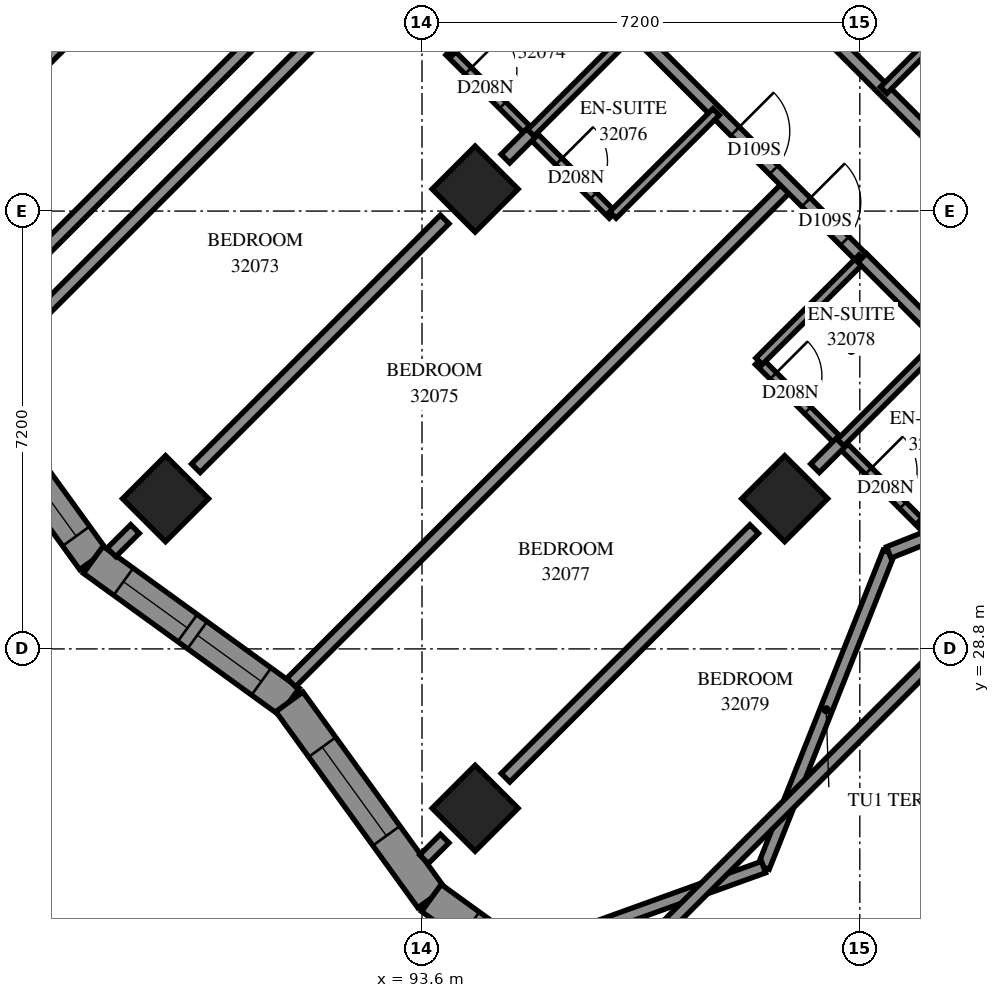
"""IFC4 building model, lengths in metres.
Left out: names, types, materials, properties, quantities, classifications, styles, units other than length and angle.
Written with IfcOpenShell. Run it as: python <this file> out.ifc"""

import sys

from ifc_helpers import new_model, si_unit, direction, frame, frame_2d, origin, origin_2d, place, context, subcontext, project, spatial, polyline, rectangle, outline, extrude, element, fill, save


model = new_model("IFC4")
c1 = context("Model", 3, precision=1e-05, world=origin(), true_north=direction((0.0, 1.0)))
c2 = subcontext(c1, "Body", "Model", "MODEL_VIEW")
j1 = project(units=[si_unit("LENGTHUNIT", "METRE"), si_unit("PLANEANGLEUNIT", "RADIAN")], contexts=[c1])
p1 = place(None, origin())
s1 = spatial("IfcSite", under=j1, at=p1, CompositionType="ELEMENT")
p2 = place(p1, origin())
s2 = spatial("IfcBuilding", under=s1, at=p2, CompositionType="ELEMENT")
p3 = place(p2, frame((0.0, 0.0, 118.6)))
s3 = spatial("IfcBuildingStorey", under=s2, at=p3, CompositionType="ELEMENT", Elevation=118.6)
for number, where, z_axis, x_axis in (
    (1, (94.474, 36.362, 0.0), (0.0, 0.0, 1.0), (0.707, -0.707, 0.0)),
    (2, (89.382, 31.271, 0.0), (0.0, 0.0, 1.0), (0.707, -0.707, 0.0)),
    (3, (99.565, 31.271, 0.0), (0.0, 0.0, 1.0), (0.707, -0.707, 0.0)),
    (4, (94.474, 26.18, 0.0), (0.0, 0.0, 1.0), (0.707, -0.707, 0.0)),
):
    element("IfcColumn", number, at=place(p3, frame(where, z_axis=z_axis, x_axis=x_axis)), inside=s3, PredefinedType="COLUMN", context=c2, shape_type="SweptSolid", body=[
        extrude(rectangle(XDim=1.0, YDim=1.0, at=origin_2d()), origin(), (0.0, 0.0, 1.0), 3.1),
    ])
p4 = place(p3, frame((87.12, 38.625, -0.3), z_axis=(0.0, 0.0, 1.0), x_axis=(0.7071067812, 0.7071067812, 0.0)))
e5 = element("IfcWall", 5, at=p4, inside=s3, PredefinedType="SHEAR", context=c2, shape_type="SweptSolid", body=[
    extrude(rectangle(XDim=14.4, YDim=0.8, at=frame_2d((7.2, 0.0))), origin(), (0.0, 0.0, 1.0), 2.7),
])
p5 = place(p4, frame((4.55, 0.0, 0.3)))
e6 = element("IfcOpeningElement", 6, at=p5, cuts=e5, PredefinedType="OPENING", context=c2, shape_type="SweptSolid", body=[
    extrude(rectangle(XDim=1.1, YDim=2.1, at=frame_2d((0.55, 1.05))), frame((0.0, 0.41, 0.0), z_axis=(0.0, -1.0, 0.0), x_axis=(1.0, 0.0, 0.0)), (0.0, 0.0, 1.0), 0.82),
])
p6 = place(p4, frame((11.35, 0.0, 0.3)))
e7 = element("IfcOpeningElement", 7, at=p6, cuts=e5, PredefinedType="OPENING", context=c2, shape_type="SweptSolid", body=[
    extrude(rectangle(XDim=1.1, YDim=2.1, at=frame_2d((0.55, 1.05))), frame((0.0, 0.41, 0.0), z_axis=(0.0, -1.0, 0.0), x_axis=(1.0, 0.0, 0.0)), (0.0, 0.0, 1.0), 0.82),
])
p7 = place(p3, frame((85.858, 33.492, 0.0), z_axis=(0.0, 0.0, 1.0), x_axis=(0.5863547381, -0.8100543939, 0.0)))
e8 = element("IfcWall", 8, at=p7, inside=s3, PredefinedType="SOLIDWALL", context=c2, shape_type="SweptSolid", body=[
    extrude(outline(polyline([(0.044, -0.275), (4.027, -0.275), (3.939, 0.275), (-0.044, 0.275), (0.044, -0.275)])), origin(), (0.0, 0.0, 1.0), 3.1),
])
p8 = place(p7, frame((0.704, 0.0, 0.5)))
e9 = element("IfcOpeningElement", 9, at=p8, cuts=e8, PredefinedType="OPENING", context=c2, shape_type="SweptSolid", body=[
    extrude(rectangle(XDim=1.3, YDim=2.45, at=frame_2d((0.65, 1.225))), frame((0.0, 0.285, 0.0), z_axis=(0.0, -1.0, 0.0), x_axis=(1.0, 0.0, 0.0)), (0.0, 0.0, 1.0), 0.57),
])
p9 = place(p7, frame((2.204, 0.0, 0.5)))
e10 = element("IfcOpeningElement", 10, at=p9, cuts=e8, PredefinedType="OPENING", context=c2, shape_type="SweptSolid", body=[
    extrude(rectangle(XDim=1.3, YDim=2.45, at=frame_2d((0.65, 1.225))), frame((0.0, 0.285, 0.0), z_axis=(0.0, -1.0, 0.0), x_axis=(1.0, 0.0, 0.0)), (0.0, 0.0, 1.0), 0.57),
])
p10 = place(p3, frame((88.193, 30.265, 0.0), z_axis=(0.0, 0.0, 1.0), x_axis=(0.8100630266, -0.5863428119, 0.0)))
e11 = element("IfcWall", 11, at=p10, inside=s3, PredefinedType="SOLIDWALL", context=c2, shape_type="SweptSolid", body=[
    extrude(outline(polyline([(-0.044, -0.275), (3.939, -0.275), (4.027, 0.275), (0.044, 0.275), (-0.044, -0.275)])), origin(), (0.0, 0.0, 1.0), 3.1),
])
p11 = place(p10, frame((0.613, 0.0, 0.5)))
e12 = element("IfcOpeningElement", 12, at=p11, cuts=e11, PredefinedType="OPENING", context=c2, shape_type="SweptSolid", body=[
    extrude(rectangle(XDim=1.3, YDim=2.45, at=frame_2d((0.65, 1.225))), frame((0.0, 0.285, 0.0), z_axis=(0.0, -1.0, 0.0), x_axis=(1.0, 0.0, 0.0)), (0.0, 0.0, 1.0), 0.57),
])
p12 = place(p10, frame((2.113, 0.0, 0.5)))
e13 = element("IfcOpeningElement", 13, at=p12, cuts=e11, PredefinedType="OPENING", context=c2, shape_type="SweptSolid", body=[
    extrude(rectangle(XDim=1.3, YDim=2.45, at=frame_2d((0.65, 1.225))), frame((0.0, 0.285, 0.0), z_axis=(0.0, -1.0, 0.0), x_axis=(1.0, 0.0, 0.0)), (0.0, 0.0, 1.0), 0.57),
])
p13 = place(p3, frame((91.42, 27.93, 0.0), z_axis=(0.0, 0.0, 1.0), x_axis=(0.5863428119, -0.8100630266, 0.0)))
e14 = element("IfcWall", 14, at=p13, inside=s3, PredefinedType="SOLIDWALL", context=c2, shape_type="SweptSolid", body=[
    extrude(outline(polyline([(0.044, -0.275), (4.027, -0.275), (3.939, 0.275), (-0.044, 0.275), (0.044, -0.275)])), origin(), (0.0, 0.0, 1.0), 3.1),
])
p14 = place(p13, frame((0.92, 0.0, 0.7)))
e15 = element("IfcOpeningElement", 15, at=p14, cuts=e14, PredefinedType="OPENING", context=c2, shape_type="SweptSolid", body=[
    extrude(rectangle(XDim=1.8, YDim=2.0, at=frame_2d((0.9, 1.0))), frame((0.0, 0.285, 0.0), z_axis=(0.0, -1.0, 0.0), x_axis=(1.0, 0.0, 0.0)), (0.0, 0.0, 1.0), 0.57),
])
p15 = place(p3, frame((93.755, 24.704, 0.0), z_axis=(0.0, 0.0, 1.0), x_axis=(0.8100529974, -0.5863566673, 0.0)))
e16 = element("IfcWall", 16, at=p15, inside=s3, PredefinedType="SOLIDWALL", context=c2, shape_type="SweptSolid", body=[
    extrude(outline(polyline([(-0.044, -0.275), (3.939, -0.275), (4.068, 0.275), (0.044, 0.275), (-0.044, -0.275)])), origin(), (0.0, 0.0, 1.0), 3.1),
])
p16 = place(p15, frame((0.774, 0.0, 0.7)))
e17 = element("IfcOpeningElement", 17, at=p16, cuts=e16, PredefinedType="OPENING", context=c2, shape_type="SweptSolid", body=[
    extrude(rectangle(XDim=1.8, YDim=2.0, at=frame_2d((0.9, 1.0))), frame((0.0, 0.285, 0.0), z_axis=(0.0, -1.0, 0.0), x_axis=(1.0, 0.0, 0.0)), (0.0, 0.0, 1.0), 0.57),
])
p17 = place(p3, frame((101.276, 30.386, 0.0), z_axis=(0.0, 0.0, 1.0), x_axis=(-0.3696934536, -0.9291537819, 0.0)))
e18 = element("IfcWall", 18, at=p17, inside=s3, PredefinedType="PARAPET", context=c2, shape_type="SweptSolid", body=[
    extrude(outline(polyline([(-0.043, -0.1), (5.524, -0.1), (5.614, 0.1), (0.043, 0.1), (-0.043, -0.1)])), origin(), (0.0, 0.0, 1.0), 0.25),
])
p18 = place(p3, frame((99.218, 25.212, 0.0), z_axis=(0.0, 0.0, 1.0), x_axis=(-0.9406904075, -0.3392662042, 0.0)))
e19 = element("IfcWall", 19, at=p18, inside=s3, PredefinedType="PARAPET", context=c2, shape_type="SweptSolid", body=[
    extrude(outline(polyline([(0.045, -0.1), (4.041, -0.1), (4.041, 0.1), (-0.045, 0.1), (0.045, -0.1)])), origin(), (0.0, 0.0, 1.0), 0.25),
])
p19 = place(p3, frame((96.465, 23.082, 0.0), z_axis=(0.0, 0.0, 1.0), x_axis=(0.707016895, 0.7071966559, 0.0)))
e20 = element("IfcWall", 20, at=p19, inside=s3, PredefinedType="PARTITIONING", context=c2, shape_type="SweptSolid", body=[
    extrude(rectangle(XDim=11.682, YDim=0.2, at=frame_2d((5.841, 0.0))), origin(), (0.0, 0.0, 1.0), 3.1),
])
p20 = place(p3, frame((86.329, 33.31, 0.0), z_axis=(0.0, 0.0, 1.0), x_axis=(0.7071067812, 0.7071067812, 0.0)))
e21 = element("IfcWall", 21, at=p20, inside=s3, PredefinedType="PARTITIONING", context=c2, shape_type="SweptSolid", body=[
    extrude(rectangle(XDim=11.617, YDim=0.2, at=frame_2d((5.808, 0.0))), origin(), (0.0, 0.0, 1.0), 3.1),
])
p21 = place(p3, frame((91.45, 28.248, 0.0), z_axis=(0.0, 0.0, 1.0), x_axis=(0.7071931644, 0.7070203875, 0.0)))
e22 = element("IfcWall", 22, at=p21, inside=s3, PredefinedType="PARTITIONING", context=c2, shape_type="SweptSolid", body=[
    extrude(rectangle(XDim=11.576, YDim=0.2, at=frame_2d((5.788, 0.0))), origin(), (0.0, 0.0, 1.0), 3.1),
])
p22 = place(p3, frame((86.835, 34.806, 0.0), z_axis=(0.0, 0.0, 1.0), x_axis=(0.7071067812, 0.7071067812, 0.0)))
e23 = element("IfcWall", 23, at=p22, inside=s3, PredefinedType="PARTITIONING", context=c2, shape_type="SweptSolid", body=[
    extrude(rectangle(XDim=10.201, YDim=0.2, at=frame_2d((5.1, 0.0))), origin(), (0.0, 0.0, 1.0), 3.1),
])
p23 = place(p22, frame((8.959, 0.0, 0.0)))
e24 = element("IfcOpeningElement", 24, at=p23, cuts=e23, PredefinedType="OPENING", context=c2, shape_type="SweptSolid", body=[
    extrude(rectangle(XDim=1.0, YDim=2.1, at=frame_2d((0.5, 1.05))), frame((0.0, 0.11, 0.0), z_axis=(0.0, -1.0, 0.0), x_axis=(1.0, 0.0, 0.0)), (0.0, 0.0, 1.0), 0.22),
])
p24 = place(p3, frame((94.047, 42.015, 0.0), z_axis=(0.0, 0.0, 1.0), x_axis=(0.7071067812, -0.7071067812, 0.0)))
e25 = element("IfcWall", 25, at=p24, inside=s3, PredefinedType="PARTITIONING", context=c2, shape_type="SweptSolid", body=[
    extrude(rectangle(XDim=9.6, YDim=0.2, at=frame_2d((4.8, 0.0))), origin(), (0.0, 0.0, 1.0), 3.1),
])
p25 = place(p24, frame((1.099, 0.0, 0.0)))
e26 = element("IfcOpeningElement", 26, at=p25, cuts=e25, PredefinedType="OPENING", context=c2, shape_type="SweptSolid", body=[
    extrude(rectangle(XDim=0.9, YDim=2.1, at=frame_2d((0.45, 1.05))), frame((0.0, 0.11, 0.0), z_axis=(0.0, -1.0, 0.0), x_axis=(1.0, 0.0, 0.0)), (0.0, 0.0, 1.0), 0.22),
])
p26 = place(p24, frame((6.649, 0.0, 0.0)))
e27 = element("IfcOpeningElement", 27, at=p26, cuts=e25, PredefinedType="OPENING", context=c2, shape_type="SweptSolid", body=[
    extrude(rectangle(XDim=0.9, YDim=2.1, at=frame_2d((0.45, 1.05))), frame((0.0, 0.11, 0.0), z_axis=(0.0, -1.0, 0.0), x_axis=(1.0, 0.0, 0.0)), (0.0, 0.0, 1.0), 0.22),
])
p27 = place(p24, frame((8.3, 0.0, 0.0)))
e28 = element("IfcOpeningElement", 28, at=p27, cuts=e25, PredefinedType="OPENING", context=c2, shape_type="SweptSolid", body=[
    extrude(rectangle(XDim=0.9, YDim=2.1, at=frame_2d((0.45, 1.05))), frame((0.0, 0.11, 0.0), z_axis=(0.0, -1.0, 0.0), x_axis=(1.0, 0.0, 0.0)), (0.0, 0.0, 1.0), 0.22),
])
p28 = place(p3, frame((96.103, 43.083, 0.0), z_axis=(0.0, 0.0, 1.0), x_axis=(0.7071067812, -0.7071067812, 0.0)))
e29 = element("IfcWall", 29, at=p28, inside=s3, PredefinedType="PARTITIONING", context=c2, shape_type="SweptSolid", body=[
    extrude(rectangle(XDim=8.491, YDim=0.2, at=frame_2d((4.245, 0.0))), origin(), (0.0, 0.0, 1.0), 3.1),
])
p29 = place(p28, frame((1.995, 0.0, 0.0)))
e30 = element("IfcOpeningElement", 30, at=p29, cuts=e29, PredefinedType="OPENING", context=c2, shape_type="SweptSolid", body=[
    extrude(rectangle(XDim=0.9, YDim=2.1, at=frame_2d((0.45, 1.05))), frame((0.0, 0.11, 0.0), z_axis=(0.0, -1.0, 0.0), x_axis=(1.0, 0.0, 0.0)), (0.0, 0.0, 1.0), 0.22),
])
p30 = place(p28, frame((4.27, 0.0, 0.0)))
e31 = element("IfcOpeningElement", 31, at=p30, cuts=e29, PredefinedType="OPENING", context=c2, shape_type="SweptSolid", body=[
    extrude(rectangle(XDim=0.9, YDim=2.1, at=frame_2d((0.45, 1.05))), frame((0.0, 0.11, 0.0), z_axis=(0.0, -1.0, 0.0), x_axis=(1.0, 0.0, 0.0)), (0.0, 0.0, 1.0), 0.22),
])
for number, where, z_axis, x_axis in (
    (32, (89.881, 31.771, 0.0), (0.0, 0.0, 1.0), (0.707, 0.707, 0.0)),
    (33, (100.063, 21.589, 0.0), (0.0, 0.0, 1.0), (0.707, 0.707, 0.0)),
):
    element("IfcWall", number, at=place(p3, frame(where, z_axis=z_axis, x_axis=x_axis)), inside=s3, PredefinedType="PARTITIONING", context=c2, shape_type="SweptSolid", body=[
        extrude(rectangle(XDim=5.787, YDim=0.2, at=frame_2d((2.893, 0.0))), origin(), (0.0, 0.0, 1.0), 3.1),
    ])
p31 = place(p3, frame((94.973, 26.681, 0.0), z_axis=(0.0, 0.0, 1.0), x_axis=(0.7071067812, 0.7071067812, 0.0)))
e34 = element("IfcWall", 34, at=p31, inside=s3, PredefinedType="PARTITIONING", context=c2, shape_type="SweptSolid", body=[
    extrude(rectangle(XDim=5.784, YDim=0.2, at=frame_2d((2.892, 0.0))), origin(), (0.0, 0.0, 1.0), 2.6),
])
p32 = place(p3, frame((99.137, 33.531, 0.0), z_axis=(0.0, 0.0, 1.0), x_axis=(0.7071067812, -0.7071067812, 0.0)))
e35 = element("IfcWall", 35, at=p32, inside=s3, PredefinedType="PARTITIONING", context=c2, shape_type="SweptSolid", body=[
    extrude(rectangle(XDim=3.801, YDim=0.15, at=frame_2d((1.901, 0.0))), origin(), (0.0, 0.0, 1.0), 3.1),
])
p33 = place(p32, frame((0.339, 0.0, 0.0)))
e36 = element("IfcOpeningElement", 36, at=p33, cuts=e35, PredefinedType="OPENING", context=c2, shape_type="SweptSolid", body=[
    extrude(rectangle(XDim=0.8, YDim=2.1, at=frame_2d((0.4, 1.05))), frame((0.0, 0.085, 0.0), z_axis=(0.0, -1.0, 0.0), x_axis=(1.0, 0.0, 0.0)), (0.0, 0.0, 1.0), 0.17),
])
p34 = place(p32, frame((2.553, 0.0, 0.0)))
e37 = element("IfcOpeningElement", 37, at=p34, cuts=e35, PredefinedType="OPENING", context=c2, shape_type="SweptSolid", body=[
    extrude(rectangle(XDim=0.8, YDim=2.1, at=frame_2d((0.4, 1.05))), frame((0.0, 0.085, 0.0), z_axis=(0.0, -1.0, 0.0), x_axis=(1.0, 0.0, 0.0)), (0.0, 0.0, 1.0), 0.17),
])
p35 = place(p3, frame((94.047, 38.621, 0.0), z_axis=(0.0, 0.0, 1.0), x_axis=(0.7071067812, -0.7071067812, 0.0)))
e38 = element("IfcWall", 38, at=p35, inside=s3, PredefinedType="PARTITIONING", context=c2, shape_type="SweptSolid", body=[
    extrude(rectangle(XDim=3.799, YDim=0.15, at=frame_2d((1.899, 0.0))), origin(), (0.0, 0.0, 1.0), 3.1),
])
p36 = place(p35, frame((0.444, 0.0, 0.0)))
e39 = element("IfcOpeningElement", 39, at=p36, cuts=e38, PredefinedType="OPENING", context=c2, shape_type="SweptSolid", body=[
    extrude(rectangle(XDim=0.8, YDim=2.1, at=frame_2d((0.4, 1.05))), frame((0.0, 0.085, 0.0), z_axis=(0.0, -1.0, 0.0), x_axis=(1.0, 0.0, 0.0)), (0.0, 0.0, 1.0), 0.17),
])
p37 = place(p35, frame((2.551, 0.0, 0.0)))
e40 = element("IfcOpeningElement", 40, at=p37, cuts=e38, PredefinedType="OPENING", context=c2, shape_type="SweptSolid", body=[
    extrude(rectangle(XDim=0.8, YDim=2.1, at=frame_2d((0.4, 1.05))), frame((0.0, 0.085, 0.0), z_axis=(0.0, -1.0, 0.0), x_axis=(1.0, 0.0, 0.0)), (0.0, 0.0, 1.0), 0.17),
])
for number, where, z_axis, x_axis in (
    (41, (101.192, 37.988, 0.0), (0.0, 0.0, 1.0), (0.707, 0.708, 0.0)),
    (42, (95.389, 37.285, 0.0), (0.0, 0.0, 1.0), (0.708, 0.707, 0.0)),
    (43, (94.052, 38.622, 0.0), (0.0, 0.0, 1.0), (0.707, 0.708, 0.0)),
    (44, (96.739, 35.935, 0.0), (0.0, 0.0, 1.0), (0.708, 0.707, 0.0)),
    (45, (99.143, 33.531, 0.0), (0.0, 0.0, 1.0), (0.708, 0.707, 0.0)),
    (46, (101.83, 30.844, 0.0), (0.0, 0.0, 1.0), (0.707, 0.708, 0.0)),
):
    element("IfcWall", number, at=place(p3, frame(where, z_axis=z_axis, x_axis=x_axis)), inside=s3, PredefinedType="PARTITIONING", context=c2, shape_type="SweptSolid", body=[
        extrude(rectangle(XDim=2.4, YDim=0.15, at=frame_2d((1.2, 0.0))), origin(), (0.0, 0.0, 1.0), 3.1),
    ])
p38 = place(p3, frame((100.483, 32.191, 0.0), z_axis=(0.0, 0.0, 1.0), x_axis=(0.7071067812, 0.7071067812, 0.0)))
e47 = element("IfcWall", 47, at=p38, inside=s3, PredefinedType="PARTITIONING", context=c2, shape_type="SweptSolid", body=[
    extrude(rectangle(XDim=2.398, YDim=0.15, at=frame_2d((1.199, 0.0))), origin(), (0.0, 0.0, 1.0), 2.6),
])
p39 = place(p3, frame((100.839, 35.231, 0.0), z_axis=(0.0, 0.0, 1.0), x_axis=(0.7065800724, -0.7076330979, 0.0)))
e48 = element("IfcWall", 48, at=p39, inside=s3, PredefinedType="PARTITIONING", context=c2, shape_type="SweptSolid", body=[
    extrude(rectangle(XDim=1.899, YDim=0.2, at=frame_2d((0.95, 0.0))), origin(), (0.0, 0.0, 1.0), 3.1),
])
p40 = place(p3, frame((94.972, 36.862, 0.0), z_axis=(0.0, 0.0, 1.0), x_axis=(0.7071067812, 0.7071067812, 0.0)))
e49 = element("IfcWall", 49, at=p40, inside=s3, PredefinedType="PARTITIONING", context=c2, shape_type="SweptSolid", body=[
    extrude(rectangle(XDim=0.594, YDim=0.2, at=frame_2d((0.297, 0.0))), origin(), (0.0, 0.0, 1.0), 3.1),
])
p41 = place(p3, frame((100.063, 31.771, 0.0), z_axis=(0.0, 0.0, 1.0), x_axis=(0.7071067812, 0.7071067812, 0.0)))
e50 = element("IfcWall", 50, at=p41, inside=s3, PredefinedType="PARTITIONING", context=c2, shape_type="SweptSolid", body=[
    extrude(rectangle(XDim=0.594, YDim=0.2, at=frame_2d((0.297, 0.0))), origin(), (0.0, 0.0, 1.0), 2.6),
])
p42 = place(p3, frame((88.494, 30.388, 0.0), z_axis=(0.0, 0.0, 1.0), x_axis=(0.709396765, 0.7048093571, 0.0)))
e51 = element("IfcWall", 51, at=p42, inside=s3, PredefinedType="PARTITIONING", context=c2, shape_type="SweptSolid", body=[
    extrude(rectangle(XDim=0.545, YDim=0.2, at=frame_2d((0.273, 0.0))), origin(), (0.0, 0.0, 1.0), 3.1),
])
p43 = place(p3, frame((93.633, 25.341, 0.0), z_axis=(0.0, 0.0, 1.0), x_axis=(0.7071067812, 0.7071067812, 0.0)))
e52 = element("IfcWall", 52, at=p43, inside=s3, PredefinedType="PARTITIONING", context=c2, shape_type="SweptSolid", body=[
    extrude(rectangle(XDim=0.481, YDim=0.2, at=frame_2d((0.24, 0.0))), origin(), (0.0, 0.0, 1.0), 3.1),
])
p44 = place(p3, frame((103.29, 31.188, 0.0), z_axis=(0.0, 0.0, 1.0), x_axis=(-0.9291561184, -0.3696875811, 0.0)))
e53 = element("IfcWall", 53, at=p44, inside=s3, PredefinedType="PARAPET", context=c2, shape_type="SweptSolid", body=[
    extrude(outline(polyline([(0.0, -0.1), (2.21, -0.1), (2.124, 0.1), (0.0, 0.1), (0.0, -0.1)])), origin(), (0.0, 0.0, 1.0), 0.25),
])
p45 = place(p9, origin())
e54 = element("IfcWindow", 54, at=p45, inside=s3, PartitioningType="SINGLE_PANEL", PredefinedType="WINDOW", context=c2, shape_type="SweptSolid", body=[
    extrude(rectangle(XDim=1.3, YDim=2.45, at=frame_2d((0.65, 1.225))), frame((0.0, 0.155, 0.0), z_axis=(0.0, -1.0, 0.0), x_axis=(1.0, 0.0, 0.0)), (0.0, 0.0, 1.0), 0.06),
])
fill(e10, e54)
p46 = place(p11, origin())
e55 = element("IfcWindow", 55, at=p46, inside=s3, PartitioningType="SINGLE_PANEL", PredefinedType="WINDOW", context=c2, shape_type="SweptSolid", body=[
    extrude(rectangle(XDim=1.3, YDim=2.45, at=frame_2d((0.65, 1.225))), frame((0.0, 0.155, 0.0), z_axis=(0.0, -1.0, 0.0), x_axis=(1.0, 0.0, 0.0)), (0.0, 0.0, 1.0), 0.06),
])
fill(e12, e55)
p47 = place(p12, origin())
e56 = element("IfcWindow", 56, at=p47, inside=s3, PartitioningType="SINGLE_PANEL", PredefinedType="WINDOW", context=c2, shape_type="SweptSolid", body=[
    extrude(rectangle(XDim=1.3, YDim=2.45, at=frame_2d((0.65, 1.225))), frame((0.0, 0.155, 0.0), z_axis=(0.0, -1.0, 0.0), x_axis=(1.0, 0.0, 0.0)), (0.0, 0.0, 1.0), 0.06),
])
fill(e13, e56)
p48 = place(p14, origin())
e57 = element("IfcWindow", 57, at=p48, inside=s3, PartitioningType="SINGLE_PANEL", PredefinedType="WINDOW", context=c2, shape_type="SweptSolid", body=[
    extrude(rectangle(XDim=1.8, YDim=2.0, at=frame_2d((0.9, 1.0))), frame((0.0, 0.155, 0.0), z_axis=(0.0, -1.0, 0.0), x_axis=(1.0, 0.0, 0.0)), (0.0, 0.0, 1.0), 0.06),
])
fill(e15, e57)
p49 = place(p16, origin())
e58 = element("IfcWindow", 58, at=p49, inside=s3, PartitioningType="SINGLE_PANEL", PredefinedType="WINDOW", context=c2, shape_type="SweptSolid", body=[
    extrude(rectangle(XDim=1.8, YDim=2.0, at=frame_2d((0.9, 1.0))), frame((0.0, 0.155, 0.0), z_axis=(0.0, -1.0, 0.0), x_axis=(1.0, 0.0, 0.0)), (0.0, 0.0, 1.0), 0.06),
])
fill(e17, e58)
p50 = place(p36, origin())
e59 = element("IfcDoor", 59, at=p50, inside=s3, OperationType="SINGLE_SWING_RIGHT", PredefinedType="DOOR", context=c2, shape_type="SweptSolid", body=[
    extrude(rectangle(XDim=0.8, YDim=2.1, at=frame_2d((0.4, 1.05))), frame((0.0, 0.025, 0.0), z_axis=(0.0, -1.0, 0.0), x_axis=(1.0, 0.0, 0.0)), (0.0, 0.0, 1.0), 0.05),
])
fill(e39, e59)
p51 = place(p26, origin())
e60 = element("IfcDoor", 60, at=p51, inside=s3, OperationType="SINGLE_SWING_RIGHT", PredefinedType="DOOR", context=c2, shape_type="SweptSolid", body=[
    extrude(rectangle(XDim=0.9, YDim=2.1, at=frame_2d((0.45, 1.05))), frame((0.0, 0.025, 0.0), z_axis=(0.0, -1.0, 0.0), x_axis=(1.0, 0.0, 0.0)), (0.0, 0.0, 1.0), 0.05),
])
fill(e27, e60)
p52 = place(p37, origin())
e61 = element("IfcDoor", 61, at=p52, inside=s3, OperationType="SINGLE_SWING_RIGHT", PredefinedType="DOOR", context=c2, shape_type="SweptSolid", body=[
    extrude(rectangle(XDim=0.8, YDim=2.1, at=frame_2d((0.4, 1.05))), frame((0.0, 0.025, 0.0), z_axis=(0.0, -1.0, 0.0), x_axis=(1.0, 0.0, 0.0)), (0.0, 0.0, 1.0), 0.05),
])
fill(e40, e61)
p53 = place(p27, origin())
e62 = element("IfcDoor", 62, at=p53, inside=s3, OperationType="SINGLE_SWING_LEFT", PredefinedType="DOOR", context=c2, shape_type="SweptSolid", body=[
    extrude(rectangle(XDim=0.9, YDim=2.1, at=frame_2d((0.45, 1.05))), frame((0.0, 0.025, 0.0), z_axis=(0.0, -1.0, 0.0), x_axis=(1.0, 0.0, 0.0)), (0.0, 0.0, 1.0), 0.05),
])
fill(e28, e62)
p54 = place(p33, origin())
e63 = element("IfcDoor", 63, at=p54, inside=s3, OperationType="SINGLE_SWING_RIGHT", PredefinedType="DOOR", context=c2, shape_type="SweptSolid", body=[
    extrude(rectangle(XDim=0.8, YDim=2.1, at=frame_2d((0.4, 1.05))), frame((0.0, 0.025, 0.0), z_axis=(0.0, -1.0, 0.0), x_axis=(1.0, 0.0, 0.0)), (0.0, 0.0, 1.0), 0.05),
])
fill(e36, e63)
p55 = place(p34, origin())
e64 = element("IfcDoor", 64, at=p55, inside=s3, OperationType="SINGLE_SWING_RIGHT", PredefinedType="DOOR", context=c2, shape_type="SweptSolid", body=[
    extrude(rectangle(XDim=0.8, YDim=2.1, at=frame_2d((0.4, 1.05))), frame((0.0, 0.025, 0.0), z_axis=(0.0, -1.0, 0.0), x_axis=(1.0, 0.0, 0.0)), (0.0, 0.0, 1.0), 0.05),
])
fill(e37, e64)
save(model, sys.argv[1])
